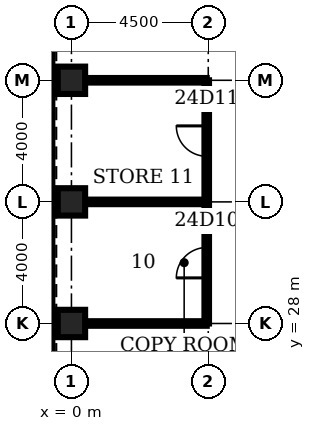
"""IFC4 building model, lengths in metres.
Left out: names, types, materials, properties, quantities, classifications, styles, units other than length and angle.
Written with IfcOpenShell. Run it as: python <this file> out.ifc"""

import sys

from ifc_helpers import new_model, si_unit, direction, frame, frame_2d, origin, origin_2d, place, context, subcontext, project, spatial, rectangle, hollow_rectangle, extrude, element, fill, save


model = new_model("IFC4")
c1 = context("Model", 3, precision=1e-05, world=origin(), true_north=direction((0.0, 1.0)))
c2 = subcontext(c1, "Body", "Model", "MODEL_VIEW")
j1 = project(units=[si_unit("LENGTHUNIT", "METRE"), si_unit("PLANEANGLEUNIT", "RADIAN")], contexts=[c1])
p1 = place(None, origin())
s1 = spatial("IfcSite", under=j1, at=p1, CompositionType="ELEMENT")
p2 = place(p1, origin())
s2 = spatial("IfcBuilding", under=s1, at=p2, CompositionType="ELEMENT")
p3 = place(p2, frame((0.0, 0.0, 113.1)))
s3 = spatial("IfcBuildingStorey", under=s2, at=p3, CompositionType="ELEMENT", Elevation=113.1)
for number, where, z_axis, x_axis in (
    (1, (0.0, 36.0, 0.0), (0.0, 0.0, 1.0), (1.0, 0.0, 0.0)),
    (2, (0.0, 32.0, 0.0), (0.0, 0.0, 1.0), (1.0, 0.0, 0.0)),
    (3, (0.0, 28.0, 0.0), (0.0, 0.0, 1.0), (1.0, 0.0, 0.0)),
):
    element("IfcColumn", number, at=place(p3, frame(where, z_axis=z_axis, x_axis=x_axis)), inside=s3, PredefinedType="COLUMN", context=c2, shape_type="SweptSolid", body=[
        extrude(hollow_rectangle(XDim=0.9, YDim=0.9, WallThickness=0.11, at=origin_2d()), origin(), (0.0, 0.0, 1.0), 4.2),
    ])
for number, where, z_axis, x_axis in (
    (4, (0.45, 28.0, 0.0), (0.0, 0.0, 1.0), (1.0, 0.0, 0.0)),
    (5, (0.45, 32.0, 0.0), (0.0, 0.0, 1.0), (1.0, 0.0, 0.0)),
    (6, (0.45, 36.0, 0.0), (0.0, 0.0, 1.0), (1.0, 0.0, 0.0)),
):
    element("IfcWall", number, at=place(p3, frame(where, z_axis=z_axis, x_axis=x_axis)), inside=s3, PredefinedType="PARTITIONING", context=c2, shape_type="SweptSolid", body=[
        extrude(rectangle(XDim=4.0, YDim=0.15, at=frame_2d((2.0, 0.0))), origin(), (0.0, 0.0, 1.0), 3.0),
    ])
p4 = place(p3, frame((4.45, 28.0, 0.0), z_axis=(0.0, 0.0, 1.0), x_axis=(0.0, 1.0, 0.0)))
e7 = element("IfcWall", 7, at=p4, inside=s3, PredefinedType="PARTITIONING", context=c2, shape_type="SweptSolid", body=[
    extrude(rectangle(XDim=8.0, YDim=0.15, at=frame_2d((4.0, 0.0))), origin(), (0.0, 0.0, 1.0), 3.0),
])
p5 = place(p4, frame((1.5, 0.0, 0.0)))
e8 = element("IfcOpeningElement", 8, at=p5, cuts=e7, PredefinedType="OPENING", context=c2, shape_type="SweptSolid", body=[
    extrude(rectangle(XDim=1.0, YDim=2.1, at=frame_2d((0.5, 1.05))), frame((0.0, 0.085, 0.0), z_axis=(0.0, -1.0, 0.0), x_axis=(1.0, 0.0, 0.0)), (0.0, 0.0, 1.0), 0.17),
])
p6 = place(p4, frame((5.5, 0.0, 0.0)))
e9 = element("IfcOpeningElement", 9, at=p6, cuts=e7, PredefinedType="OPENING", context=c2, shape_type="SweptSolid", body=[
    extrude(rectangle(XDim=1.0, YDim=2.1, at=frame_2d((0.5, 1.05))), frame((0.0, 0.085, 0.0), z_axis=(0.0, -1.0, 0.0), x_axis=(1.0, 0.0, 0.0)), (0.0, 0.0, 1.0), 0.17),
])
p7 = place(p5, origin())
e10 = element("IfcDoor", 10, at=p7, inside=s3, OperationType="SINGLE_SWING_LEFT", PredefinedType="DOOR", context=c2, shape_type="SweptSolid", body=[
    extrude(rectangle(XDim=1.0, YDim=2.1, at=frame_2d((0.5, 1.05))), frame((0.0, 0.025, 0.0), z_axis=(0.0, -1.0, 0.0), x_axis=(1.0, 0.0, 0.0)), (0.0, 0.0, 1.0), 0.05),
])
fill(e8, e10)
p8 = place(p6, origin())
e11 = element("IfcDoor", 11, at=p8, inside=s3, OperationType="SINGLE_SWING_RIGHT", PredefinedType="DOOR", context=c2, shape_type="SweptSolid", body=[
    extrude(rectangle(XDim=1.0, YDim=2.1, at=frame_2d((0.5, 1.05))), frame((0.0, 0.025, 0.0), z_axis=(0.0, -1.0, 0.0), x_axis=(1.0, 0.0, 0.0)), (0.0, 0.0, 1.0), 0.05),
])
fill(e9, e11)
save(model, sys.argv[1])
